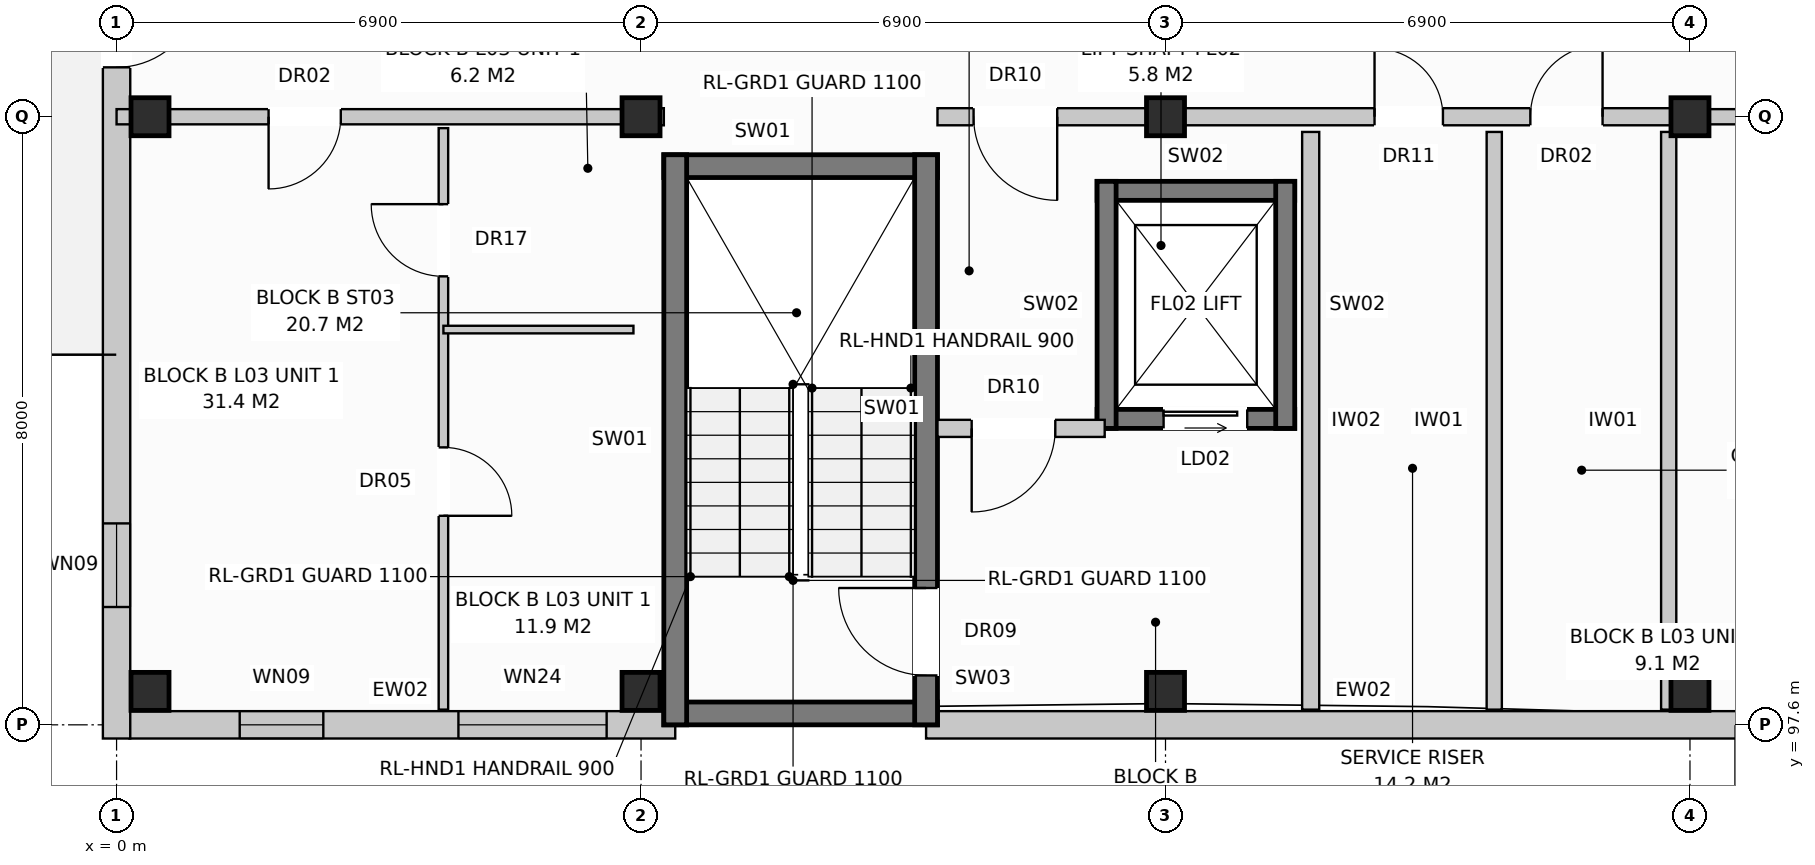
"""IFC4 building model, lengths in metres.
Left out: names, types, materials, properties, quantities, classifications, styles, units other than length and angle.
Written with IfcOpenShell. Run it as: python <this file> out.ifc"""

import sys

from ifc_helpers import new_model, si_unit, direction, frame, frame_2d, origin, origin_with_axes, origin_2d, place, context, subcontext, project, spatial, rectangle, extrude, element, fill, save


model = new_model("IFC4")
c1 = context("Model", 3, precision=1e-05, world=origin(), true_north=direction((0.0, 1.0)))
c2 = subcontext(c1, "Body", "Model", "MODEL_VIEW")
j1 = project(units=[si_unit("LENGTHUNIT", "METRE"), si_unit("PLANEANGLEUNIT", "RADIAN")], contexts=[c1])
p1 = place(None, origin())
s1 = spatial("IfcSite", under=j1, at=p1, CompositionType="ELEMENT")
p2 = place(p1, origin())
s2 = spatial("IfcBuilding", under=s1, at=p2, CompositionType="ELEMENT")
p3 = place(p2, frame((0.0, 0.0, 11.2)))
s3 = spatial("IfcBuildingStorey", under=s2, at=p3, CompositionType="ELEMENT", Elevation=11.2)
for number, where, z_axis, x_axis in (
    (1, (0.44, 98.04, 0.0), (0.0, 0.0, 1.0), (1.0, 0.0, 0.0)),
    (2, (0.44, 105.6, 0.0), (0.0, 0.0, 1.0), (1.0, 0.0, 0.0)),
    (3, (6.9, 98.04, 0.0), (0.0, 0.0, 1.0), (1.0, 0.0, 0.0)),
    (4, (6.9, 105.6, 0.0), (0.0, 0.0, 1.0), (1.0, 0.0, 0.0)),
    (5, (13.8, 98.04, 0.0), (0.0, 0.0, 1.0), (1.0, 0.0, 0.0)),
    (6, (13.8, 105.6, 0.0), (0.0, 0.0, 1.0), (1.0, 0.0, 0.0)),
    (7, (20.7, 98.04, 0.0), (0.0, 0.0, 1.0), (1.0, 0.0, 0.0)),
    (8, (20.7, 105.6, 0.0), (0.0, 0.0, 1.0), (1.0, 0.0, 0.0)),
):
    element("IfcColumn", number, at=place(p3, frame(where, z_axis=z_axis, x_axis=x_axis)), inside=s3, PredefinedType="COLUMN", context=c2, shape_type="SweptSolid", body=[
        extrude(rectangle(XDim=0.5, YDim=0.5, at=origin_2d()), origin(), (0.0, 0.0, 1.0), 3.2),
    ])
p4 = place(p3, frame((0.17, 97.6, 0.0), z_axis=(0.0, 0.0, 1.0), x_axis=(1.0, 0.0, 0.0)))
e9 = element("IfcWall", 9, at=p4, inside=s3, PredefinedType="STANDARD", context=c2, shape_type="SweptSolid", body=[
    extrude(rectangle(XDim=7.18, YDim=0.36, at=frame_2d((3.59, 0.0))), origin(), (0.0, 0.0, 1.0), 2.94),
])
p5 = place(p4, frame((1.45, 0.0, 0.72)))
e10 = element("IfcOpeningElement", 10, at=p5, cuts=e9, PredefinedType="OPENING", context=c2, shape_type="SweptSolid", body=[
    extrude(rectangle(XDim=1.1, YDim=1.5, at=frame_2d((0.55, 0.75))), frame((0.0, 0.192, 0.0), z_axis=(0.0, -1.0, 0.0), x_axis=(1.0, 0.0, 0.0)), (0.0, 0.0, 1.0), 0.384),
])
p6 = place(p4, frame((4.327, 0.0, 0.8)))
e11 = element("IfcOpeningElement", 11, at=p6, cuts=e9, PredefinedType="OPENING", context=c2, shape_type="SweptSolid", body=[
    extrude(rectangle(XDim=1.95, YDim=1.65, at=frame_2d((0.975, 0.825))), frame((0.0, 0.192, 0.0), z_axis=(0.0, -1.0, 0.0), x_axis=(1.0, 0.0, 0.0)), (0.0, 0.0, 1.0), 0.384),
])
p7 = place(p3, frame((10.65, 97.6, 0.0), z_axis=(0.0, 0.0, 1.0), x_axis=(1.0, 0.0, 0.0)))
e12 = element("IfcWall", 12, at=p7, inside=s3, PredefinedType="STANDARD", context=c2, shape_type="SweptSolid", body=[
    extrude(rectangle(XDim=17.4, YDim=0.36, at=frame_2d((8.7, 0.0))), origin(), (0.0, 0.0, 1.0), 2.94),
])
p8 = place(p7, frame((11.82, 0.0, 0.0)))
e13 = element("IfcOpeningElement", 13, at=p8, cuts=e12, PredefinedType="OPENING", context=c2, shape_type="SweptSolid", body=[
    extrude(rectangle(XDim=1.05, YDim=2.12, at=frame_2d((0.525, 1.06))), frame((0.0, 0.192, 0.0), z_axis=(0.0, -1.0, 0.0), x_axis=(1.0, 0.0, 0.0)), (0.0, 0.0, 1.0), 0.384),
])
p9 = place(p7, frame((14.87, 0.0, 0.72)))
e14 = element("IfcOpeningElement", 14, at=p9, cuts=e12, PredefinedType="OPENING", context=c2, shape_type="SweptSolid", body=[
    extrude(rectangle(XDim=1.1, YDim=1.5, at=frame_2d((0.55, 0.75))), frame((0.0, 0.192, 0.0), z_axis=(0.0, -1.0, 0.0), x_axis=(1.0, 0.0, 0.0)), (0.0, 0.0, 1.0), 0.384),
])
p10 = place(p3, frame((0.0, 97.42, 0.0), z_axis=(0.0, 0.0, 1.0), x_axis=(0.0, 1.0, 0.0)))
e15 = element("IfcWall", 15, at=p10, inside=s3, PredefinedType="STANDARD", context=c2, shape_type="SweptSolid", body=[
    extrude(rectangle(XDim=18.76, YDim=0.36, at=frame_2d((9.38, 0.0))), origin(), (0.0, 0.0, 1.0), 2.94),
])
p11 = place(p10, frame((8.83, 0.0, 0.0)))
e16 = element("IfcOpeningElement", 16, at=p11, cuts=e15, PredefinedType="OPENING", context=c2, shape_type="SweptSolid", body=[
    extrude(rectangle(XDim=1.1, YDim=2.1, at=frame_2d((0.55, 1.05))), frame((0.0, 0.192, 0.0), z_axis=(0.0, -1.0, 0.0), x_axis=(1.0, 0.0, 0.0)), (0.0, 0.0, 1.0), 0.384),
])
p12 = place(p10, frame((1.73, 0.0, 0.72)))
e17 = element("IfcOpeningElement", 17, at=p12, cuts=e15, PredefinedType="OPENING", context=c2, shape_type="SweptSolid", body=[
    extrude(rectangle(XDim=1.1, YDim=1.5, at=frame_2d((0.55, 0.75))), frame((0.0, 0.192, 0.0), z_axis=(0.0, -1.0, 0.0), x_axis=(1.0, 0.0, 0.0)), (0.0, 0.0, 1.0), 0.384),
])
p13 = place(p10, frame((15.93, 0.0, 0.72)))
e18 = element("IfcOpeningElement", 18, at=p13, cuts=e15, PredefinedType="OPENING", context=c2, shape_type="SweptSolid", body=[
    extrude(rectangle(XDim=1.1, YDim=1.5, at=frame_2d((0.55, 0.75))), frame((0.0, 0.192, 0.0), z_axis=(0.0, -1.0, 0.0), x_axis=(1.0, 0.0, 0.0)), (0.0, 0.0, 1.0), 0.384),
])
for number, where, z_axis, x_axis in (
    (19, (7.2, 97.75, 0.0), (0.0, 0.0, 1.0), (1.0, 0.0, 0.0)),
    (20, (7.2, 104.95, 0.0), (0.0, 0.0, 1.0), (1.0, 0.0, 0.0)),
):
    element("IfcWall", number, at=place(p3, frame(where, z_axis=z_axis, x_axis=x_axis)), inside=s3, PredefinedType="SHEAR", context=c2, shape_type="SweptSolid", body=[
        extrude(rectangle(XDim=3.6, YDim=0.3, at=frame_2d((1.8, 0.0))), origin(), (0.0, 0.0, 1.0), 2.94),
    ])
p14 = place(p3, frame((7.35, 97.6, 0.0), z_axis=(0.0, 0.0, 1.0), x_axis=(0.0, 1.0, 0.0)))
e21 = element("IfcWall", 21, at=p14, inside=s3, PredefinedType="SHEAR", context=c2, shape_type="SweptSolid", body=[
    extrude(rectangle(XDim=7.5, YDim=0.3, at=frame_2d((3.75, 0.0))), origin(), (0.0, 0.0, 1.0), 2.94),
])
p15 = place(p3, frame((10.65, 97.6, 0.0), z_axis=(0.0, 0.0, 1.0), x_axis=(0.0, 1.0, 0.0)))
e22 = element("IfcWall", 22, at=p15, inside=s3, PredefinedType="SHEAR", context=c2, shape_type="SweptSolid", body=[
    extrude(rectangle(XDim=7.5, YDim=0.3, at=frame_2d((3.75, 0.0))), origin(), (0.0, 0.0, 1.0), 2.94),
])
p16 = place(p15, frame((0.65, 0.0, 0.0)))
e23 = element("IfcOpeningElement", 23, at=p16, cuts=e22, PredefinedType="OPENING", context=c2, shape_type="SweptSolid", body=[
    extrude(rectangle(XDim=1.15, YDim=2.15, at=frame_2d((0.575, 1.075))), frame((0.0, 0.162, 0.0), z_axis=(0.0, -1.0, 0.0), x_axis=(1.0, 0.0, 0.0)), (0.0, 0.0, 1.0), 0.324),
])
p17 = place(p3, frame((12.9, 101.625, 0.0), z_axis=(0.0, 0.0, 1.0), x_axis=(1.0, 0.0, 0.0)))
e24 = element("IfcWall", 24, at=p17, inside=s3, PredefinedType="SHEAR", context=c2, shape_type="SweptSolid", body=[
    extrude(rectangle(XDim=2.6, YDim=0.25, at=frame_2d((1.3, 0.0))), origin(), (0.0, 0.0, 1.0), 2.94),
])
p18 = place(p17, frame((0.875, 0.0, 0.0)))
e25 = element("IfcOpeningElement", 25, at=p18, cuts=e24, PredefinedType="OPENING", context=c2, shape_type="SweptSolid", body=[
    extrude(rectangle(XDim=1.1, YDim=2.1, at=frame_2d((0.55, 1.05))), frame((0.0, 0.137, 0.0), z_axis=(0.0, -1.0, 0.0), x_axis=(1.0, 0.0, 0.0)), (0.0, 0.0, 1.0), 0.274),
])
p19 = place(p3, frame((12.9, 104.625, 0.0), z_axis=(0.0, 0.0, 1.0), x_axis=(1.0, 0.0, 0.0)))
e26 = element("IfcWall", 26, at=p19, inside=s3, PredefinedType="SHEAR", context=c2, shape_type="SweptSolid", body=[
    extrude(rectangle(XDim=2.6, YDim=0.25, at=frame_2d((1.3, 0.0))), origin(), (0.0, 0.0, 1.0), 2.94),
])
for number, where, z_axis, x_axis in (
    (27, (13.025, 101.5, 0.0), (0.0, 0.0, 1.0), (0.0, 1.0, 0.0)),
    (28, (15.375, 101.5, 0.0), (0.0, 0.0, 1.0), (0.0, 1.0, 0.0)),
):
    element("IfcWall", number, at=place(p3, frame(where, z_axis=z_axis, x_axis=x_axis)), inside=s3, PredefinedType="SHEAR", context=c2, shape_type="SweptSolid", body=[
        extrude(rectangle(XDim=3.25, YDim=0.25, at=frame_2d((1.625, 0.0))), origin(), (0.0, 0.0, 1.0), 2.94),
    ])
p20 = place(p3, frame((15.71, 97.8, 0.0), z_axis=(0.0, 0.0, 1.0), x_axis=(0.0, 1.0, 0.0)))
e29 = element("IfcWall", 29, at=p20, inside=s3, PredefinedType="PARTITIONING", context=c2, shape_type="SweptSolid", body=[
    extrude(rectangle(XDim=7.6, YDim=0.225, at=frame_2d((3.8, 0.0))), origin(), (0.0, 0.0, 1.0), 2.59),
])
p21 = place(p3, frame((10.8, 101.5, 0.0), z_axis=(0.0, 0.0, 1.0), x_axis=(1.0, 0.0, 0.0)))
e30 = element("IfcWall", 30, at=p21, inside=s3, PredefinedType="PARTITIONING", context=c2, shape_type="SweptSolid", body=[
    extrude(rectangle(XDim=2.2, YDim=0.225, at=frame_2d((1.1, 0.0))), origin(), (0.0, 0.0, 1.0), 2.94),
])
p22 = place(p21, frame((0.45, 0.0, 0.0)))
e31 = element("IfcOpeningElement", 31, at=p22, cuts=e30, PredefinedType="OPENING", context=c2, shape_type="SweptSolid", body=[
    extrude(rectangle(XDim=1.1, YDim=2.15, at=frame_2d((0.55, 1.075))), frame((0.0, 0.125, 0.0), z_axis=(0.0, -1.0, 0.0), x_axis=(1.0, 0.0, 0.0)), (0.0, 0.0, 1.0), 0.249),
])
p23 = place(p3, frame((6.9, 105.6, 0.0), z_axis=(0.0, 0.0, 1.0), x_axis=(1.0, 0.0, 0.0)))
e32 = element("IfcWall", 32, at=p23, inside=s3, PredefinedType="PARTITIONING", context=c2, shape_type="SweptSolid", body=[
    extrude(rectangle(XDim=0.3, YDim=0.225, at=frame_2d((0.15, 0.0))), origin(), (0.0, 0.0, 1.0), 2.94),
])
for number, where, z_axis, x_axis in (
    (33, (18.125, 97.8, 0.0), (0.0, 0.0, 1.0), (0.0, 1.0, 0.0)),
    (34, (20.42, 97.8, 0.0), (0.0, 0.0, 1.0), (0.0, 1.0, 0.0)),
):
    element("IfcWall", number, at=place(p3, frame(where, z_axis=z_axis, x_axis=x_axis)), inside=s3, PredefinedType="PARTITIONING", context=c2, shape_type="SweptSolid", body=[
        extrude(rectangle(XDim=7.6, YDim=0.2, at=frame_2d((3.8, 0.0))), origin(), (0.0, 0.0, 1.0), 2.94),
    ])
p24 = place(p3, frame((10.8, 105.6, 0.0), z_axis=(0.0, 0.0, 1.0), x_axis=(1.0, 0.0, 0.0)))
e35 = element("IfcWall", 35, at=p24, inside=s3, PredefinedType="PARTITIONING", context=c2, shape_type="SweptSolid", body=[
    extrude(rectangle(XDim=9.9, YDim=0.225, at=frame_2d((4.95, 0.0))), origin(), (0.0, 0.0, 1.0), 2.38),
])
p25 = place(p24, frame((0.475, 0.0, 0.0)))
e36 = element("IfcOpeningElement", 36, at=p25, cuts=e35, PredefinedType="OPENING", context=c2, shape_type="SweptSolid", body=[
    extrude(rectangle(XDim=1.1, YDim=2.15, at=frame_2d((0.55, 1.075))), frame((0.0, 0.125, 0.0), z_axis=(0.0, -1.0, 0.0), x_axis=(1.0, 0.0, 0.0)), (0.0, 0.0, 1.0), 0.249),
])
p26 = place(p24, frame((5.75, 0.0, 0.0)))
e37 = element("IfcOpeningElement", 37, at=p26, cuts=e35, PredefinedType="OPENING", context=c2, shape_type="SweptSolid", body=[
    extrude(rectangle(XDim=0.9, YDim=2.1, at=frame_2d((0.45, 1.05))), frame((0.0, 0.125, 0.0), z_axis=(0.0, -1.0, 0.0), x_axis=(1.0, 0.0, 0.0)), (0.0, 0.0, 1.0), 0.249),
])
p27 = place(p24, frame((7.8, 0.0, 0.0)))
e38 = element("IfcOpeningElement", 38, at=p27, cuts=e35, PredefinedType="OPENING", context=c2, shape_type="SweptSolid", body=[
    extrude(rectangle(XDim=0.95, YDim=2.15, at=frame_2d((0.475, 1.075))), frame((0.0, 0.125, 0.0), z_axis=(0.0, -1.0, 0.0), x_axis=(1.0, 0.0, 0.0)), (0.0, 0.0, 1.0), 0.249),
])
p28 = place(p3, frame((0.0, 105.6, 0.0), z_axis=(0.0, 0.0, 1.0), x_axis=(1.0, 0.0, 0.0)))
e39 = element("IfcWall", 39, at=p28, inside=s3, PredefinedType="PARTITIONING", context=c2, shape_type="SweptSolid", body=[
    extrude(rectangle(XDim=6.9, YDim=0.2, at=frame_2d((3.45, 0.0))), origin(), (0.0, 0.0, 1.0), 2.38),
])
p29 = place(p28, frame((2.0, 0.0, 0.0)))
e40 = element("IfcOpeningElement", 40, at=p29, cuts=e39, PredefinedType="OPENING", context=c2, shape_type="SweptSolid", body=[
    extrude(rectangle(XDim=0.95, YDim=2.15, at=frame_2d((0.475, 1.075))), frame((0.0, 0.112, 0.0), z_axis=(0.0, -1.0, 0.0), x_axis=(1.0, 0.0, 0.0)), (0.0, 0.0, 1.0), 0.224),
])
p30 = place(p3, frame((4.3, 105.45, 0.0), z_axis=(0.0, 0.0, 1.0), x_axis=(0.0, -1.0, 0.0)))
e41 = element("IfcWall", 41, at=p30, inside=s3, PredefinedType="PARTITIONING", context=c2, shape_type="SweptSolid", body=[
    extrude(rectangle(XDim=7.65, YDim=0.125, at=frame_2d((3.825, 0.0))), origin(), (0.0, 0.0, 1.0), 2.94),
])
p31 = place(p30, frame((1.0, 0.0, 0.0)))
e42 = element("IfcOpeningElement", 42, at=p31, cuts=e41, PredefinedType="OPENING", context=c2, shape_type="SweptSolid", body=[
    extrude(rectangle(XDim=0.95, YDim=2.1, at=frame_2d((0.475, 1.05))), frame((0.0, 0.074, 0.0), z_axis=(0.0, -1.0, 0.0), x_axis=(1.0, 0.0, 0.0)), (0.0, 0.0, 1.0), 0.149),
])
p32 = place(p30, frame((4.2, 0.0, 0.0)))
e43 = element("IfcOpeningElement", 43, at=p32, cuts=e41, PredefinedType="OPENING", context=c2, shape_type="SweptSolid", body=[
    extrude(rectangle(XDim=0.9, YDim=2.1, at=frame_2d((0.45, 1.05))), frame((0.0, 0.074, 0.0), z_axis=(0.0, -1.0, 0.0), x_axis=(1.0, 0.0, 0.0)), (0.0, 0.0, 1.0), 0.149),
])
p33 = place(p3, frame((4.3, 102.8, 0.0), z_axis=(0.0, 0.0, 1.0), x_axis=(1.0, 0.0, 0.0)))
e44 = element("IfcWall", 44, at=p33, inside=s3, PredefinedType="PARTITIONING", context=c2, shape_type="SweptSolid", body=[
    extrude(rectangle(XDim=2.5, YDim=0.1, at=frame_2d((1.25, 0.0))), origin(), (0.0, 0.0, 1.0), 2.94),
])
p34 = place(p3, frame((20.7, 105.6, 0.0), z_axis=(0.0, 0.0, 1.0), x_axis=(1.0, 0.0, 0.0)))
e45 = element("IfcWall", 45, at=p34, inside=s3, PredefinedType="PARTITIONING", context=c2, shape_type="SweptSolid", body=[
    extrude(rectangle(XDim=6.9, YDim=0.2, at=frame_2d((3.45, 0.0))), origin(), (0.0, 0.0, 1.0), 2.38),
])
p35 = place(p34, frame((2.0, 0.0, 0.0)))
e46 = element("IfcOpeningElement", 46, at=p35, cuts=e45, PredefinedType="OPENING", context=c2, shape_type="SweptSolid", body=[
    extrude(rectangle(XDim=0.95, YDim=2.15, at=frame_2d((0.475, 1.075))), frame((0.0, 0.112, 0.0), z_axis=(0.0, -1.0, 0.0), x_axis=(1.0, 0.0, 0.0)), (0.0, 0.0, 1.0), 0.224),
])
p36 = place(p5, origin_with_axes())
e47 = element("IfcWindow", 47, at=p36, inside=s3, PartitioningType="SINGLE_PANEL", PredefinedType="WINDOW", context=c2, shape_type="SweptSolid", body=[
    extrude(rectangle(XDim=1.1, YDim=1.5, at=frame_2d((0.55, 0.75))), frame((0.0, 0.03, 0.0), z_axis=(0.0, -1.0, 0.0), x_axis=(1.0, 0.0, 0.0)), (0.0, 0.0, 1.0), 0.06),
])
fill(e10, e47)
p37 = place(p6, origin_with_axes())
e48 = element("IfcWindow", 48, at=p37, inside=s3, PartitioningType="SINGLE_PANEL", PredefinedType="WINDOW", context=c2, shape_type="SweptSolid", body=[
    extrude(rectangle(XDim=1.95, YDim=1.65, at=frame_2d((0.975, 0.825))), frame((0.0, 0.03, 0.0), z_axis=(0.0, -1.0, 0.0), x_axis=(1.0, 0.0, 0.0)), (0.0, 0.0, 1.0), 0.06),
])
fill(e11, e48)
p38 = place(p11, frame((1.1, 0.0, 0.0), z_axis=(0.0, 0.0, 1.0), x_axis=(-1.0, 0.0, 0.0)))
e49 = element("IfcDoor", 49, at=p38, inside=s3, OperationType="SINGLE_SWING_RIGHT", PredefinedType="DOOR", context=c2, shape_type="SweptSolid", body=[
    extrude(rectangle(XDim=1.1, YDim=2.1, at=frame_2d((0.55, 1.05))), frame((0.0, 0.025, 0.0), z_axis=(0.0, -1.0, 0.0), x_axis=(1.0, 0.0, 0.0)), (0.0, 0.0, 1.0), 0.05),
])
fill(e16, e49)
p39 = place(p12, origin_with_axes())
e50 = element("IfcWindow", 50, at=p39, inside=s3, PartitioningType="SINGLE_PANEL", PredefinedType="WINDOW", context=c2, shape_type="SweptSolid", body=[
    extrude(rectangle(XDim=1.1, YDim=1.5, at=frame_2d((0.55, 0.75))), frame((0.0, 0.03, 0.0), z_axis=(0.0, -1.0, 0.0), x_axis=(1.0, 0.0, 0.0)), (0.0, 0.0, 1.0), 0.06),
])
fill(e17, e50)
p40 = place(p16, origin_with_axes())
e51 = element("IfcDoor", 51, at=p40, inside=s3, OperationType="SINGLE_SWING_RIGHT", PredefinedType="DOOR", context=c2, shape_type="SweptSolid", body=[
    extrude(rectangle(XDim=1.15, YDim=2.15, at=frame_2d((0.575, 1.075))), frame((0.0, 0.025, 0.0), z_axis=(0.0, -1.0, 0.0), x_axis=(1.0, 0.0, 0.0)), (0.0, 0.0, 1.0), 0.05),
])
fill(e23, e51)
p41 = place(p18, origin_with_axes())
e52 = element("IfcDoor", 52, at=p41, inside=s3, OperationType="SLIDING_TO_LEFT", PredefinedType="DOOR", context=c2, shape_type="SweptSolid", body=[
    extrude(rectangle(XDim=1.1, YDim=2.1, at=frame_2d((0.55, 1.05))), frame((0.0, 0.025, 0.0), z_axis=(0.0, -1.0, 0.0), x_axis=(1.0, 0.0, 0.0)), (0.0, 0.0, 1.0), 0.05),
])
fill(e25, e52)
p42 = place(p22, frame((1.1, 0.0, 0.0), z_axis=(0.0, 0.0, 1.0), x_axis=(-1.0, 0.0, 0.0)))
e53 = element("IfcDoor", 53, at=p42, inside=s3, OperationType="SINGLE_SWING_LEFT", PredefinedType="DOOR", context=c2, shape_type="SweptSolid", body=[
    extrude(rectangle(XDim=1.1, YDim=2.15, at=frame_2d((0.55, 1.075))), frame((0.0, 0.025, 0.0), z_axis=(0.0, -1.0, 0.0), x_axis=(1.0, 0.0, 0.0)), (0.0, 0.0, 1.0), 0.05),
])
fill(e31, e53)
p43 = place(p25, frame((1.1, 0.0, 0.0), z_axis=(0.0, 0.0, 1.0), x_axis=(-1.0, 0.0, 0.0)))
e54 = element("IfcDoor", 54, at=p43, inside=s3, OperationType="SINGLE_SWING_RIGHT", PredefinedType="DOOR", context=c2, shape_type="SweptSolid", body=[
    extrude(rectangle(XDim=1.1, YDim=2.15, at=frame_2d((0.55, 1.075))), frame((0.0, 0.025, 0.0), z_axis=(0.0, -1.0, 0.0), x_axis=(1.0, 0.0, 0.0)), (0.0, 0.0, 1.0), 0.05),
])
fill(e36, e54)
p44 = place(p26, origin_with_axes())
e55 = element("IfcDoor", 55, at=p44, inside=s3, OperationType="SINGLE_SWING_LEFT", PredefinedType="DOOR", context=c2, shape_type="SweptSolid", body=[
    extrude(rectangle(XDim=0.9, YDim=2.1, at=frame_2d((0.45, 1.05))), frame((0.0, 0.025, 0.0), z_axis=(0.0, -1.0, 0.0), x_axis=(1.0, 0.0, 0.0)), (0.0, 0.0, 1.0), 0.05),
])
fill(e37, e55)
p45 = place(p27, origin_with_axes())
e56 = element("IfcDoor", 56, at=p45, inside=s3, OperationType="SINGLE_SWING_RIGHT", PredefinedType="DOOR", context=c2, shape_type="SweptSolid", body=[
    extrude(rectangle(XDim=0.95, YDim=2.15, at=frame_2d((0.475, 1.075))), frame((0.0, 0.025, 0.0), z_axis=(0.0, -1.0, 0.0), x_axis=(1.0, 0.0, 0.0)), (0.0, 0.0, 1.0), 0.05),
])
fill(e38, e56)
p46 = place(p29, frame((0.95, 0.0, 0.0), z_axis=(0.0, 0.0, 1.0), x_axis=(-1.0, 0.0, 0.0)))
e57 = element("IfcDoor", 57, at=p46, inside=s3, OperationType="SINGLE_SWING_LEFT", PredefinedType="DOOR", context=c2, shape_type="SweptSolid", body=[
    extrude(rectangle(XDim=0.95, YDim=2.15, at=frame_2d((0.475, 1.075))), frame((0.0, 0.025, 0.0), z_axis=(0.0, -1.0, 0.0), x_axis=(1.0, 0.0, 0.0)), (0.0, 0.0, 1.0), 0.05),
])
fill(e40, e57)
p47 = place(p31, frame((0.95, 0.0, 0.0), z_axis=(0.0, 0.0, 1.0), x_axis=(-1.0, 0.0, 0.0)))
e58 = element("IfcDoor", 58, at=p47, inside=s3, OperationType="SINGLE_SWING_LEFT", PredefinedType="DOOR", context=c2, shape_type="SweptSolid", body=[
    extrude(rectangle(XDim=0.95, YDim=2.1, at=frame_2d((0.475, 1.05))), frame((0.0, 0.025, 0.0), z_axis=(0.0, -1.0, 0.0), x_axis=(1.0, 0.0, 0.0)), (0.0, 0.0, 1.0), 0.05),
])
fill(e42, e58)
p48 = place(p32, origin_with_axes())
e59 = element("IfcDoor", 59, at=p48, inside=s3, OperationType="SINGLE_SWING_RIGHT", PredefinedType="DOOR", context=c2, shape_type="SweptSolid", body=[
    extrude(rectangle(XDim=0.9, YDim=2.1, at=frame_2d((0.45, 1.05))), frame((0.0, 0.025, 0.0), z_axis=(0.0, -1.0, 0.0), x_axis=(1.0, 0.0, 0.0)), (0.0, 0.0, 1.0), 0.05),
])
fill(e43, e59)
save(model, sys.argv[1])
